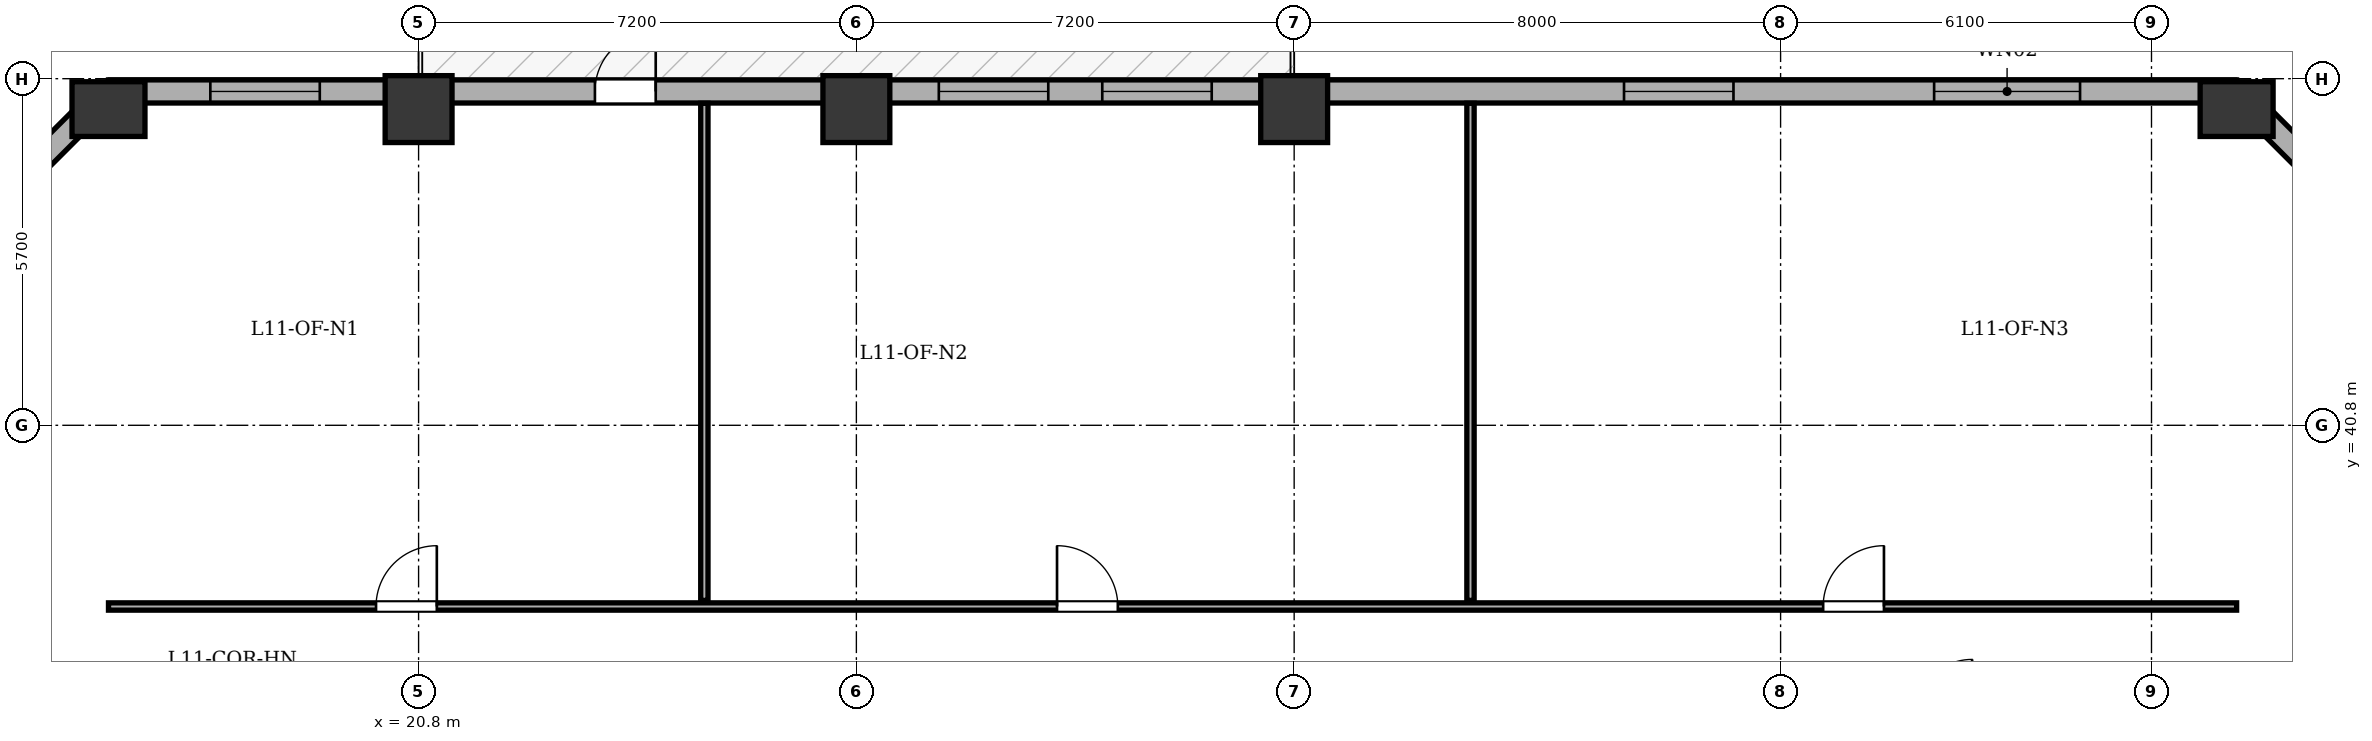
"""IFC4 building model, lengths in metres.
Left out: names, types, materials, properties, quantities, classifications, styles, units other than length and angle.
Written with IfcOpenShell. Run it as: python <this file> out.ifc"""

import sys

from ifc_helpers import new_model, si_unit, direction, frame, frame_2d, origin, origin_2d, place, context, subcontext, project, spatial, rectangle, extrude, element, fill, save


model = new_model("IFC4")
c1 = context("Model", 3, precision=1e-05, world=origin(), true_north=direction((0.0, 1.0)))
c2 = subcontext(c1, "Body", "Model", "MODEL_VIEW")
j1 = project(units=[si_unit("LENGTHUNIT", "METRE"), si_unit("PLANEANGLEUNIT", "RADIAN")], contexts=[c1])
p1 = place(None, origin())
s1 = spatial("IfcSite", under=j1, at=p1, CompositionType="ELEMENT")
p2 = place(p1, origin())
s2 = spatial("IfcBuilding", under=s1, at=p2, CompositionType="ELEMENT")
p3 = place(p2, frame((0.0, 0.0, 47.7)))
s3 = spatial("IfcBuildingStorey", under=s2, at=p3, CompositionType="ELEMENT", Elevation=47.7)
p4 = place(p3, frame((15.7, 46.0, 0.0), z_axis=(0.0, 0.0, 1.0), x_axis=(1.0, 0.0, 0.0)))
e1 = element("IfcColumn", 1, at=p4, inside=s3, PredefinedType="COLUMN", context=c2, shape_type="SweptSolid", body=[
    extrude(rectangle(XDim=0.9, YDim=1.2, at=origin_2d()), origin(), (0.0, 0.0, 1.0), 3.9),
])
for number, where, z_axis, x_axis in (
    (2, (20.8, 46.0, 0.0), (0.0, 0.0, 1.0), (1.0, 0.0, 0.0)),
    (3, (28.0, 46.0, 0.0), (0.0, 0.0, 1.0), (1.0, 0.0, 0.0)),
    (4, (35.2, 46.0, 0.0), (0.0, 0.0, 1.0), (1.0, 0.0, 0.0)),
):
    element("IfcColumn", number, at=place(p3, frame(where, z_axis=z_axis, x_axis=x_axis)), inside=s3, PredefinedType="COLUMN", context=c2, shape_type="SweptSolid", body=[
        extrude(rectangle(XDim=1.1, YDim=1.1, at=origin_2d()), origin(), (0.0, 0.0, 1.0), 3.9),
    ])
p5 = place(p3, frame((50.7, 46.0, 0.0), z_axis=(0.0, 0.0, 1.0), x_axis=(1.0, 0.0, 0.0)))
e5 = element("IfcColumn", 5, at=p5, inside=s3, PredefinedType="COLUMN", context=c2, shape_type="SweptSolid", body=[
    extrude(rectangle(XDim=0.9, YDim=1.2, at=origin_2d()), origin(), (0.0, 0.0, 1.0), 3.9),
])
p6 = place(p3, frame((10.91, 41.5, 0.0), z_axis=(0.0, 0.0, 1.0), x_axis=(0.707106781187, 0.707106781187, 0.0)))
e6 = element("IfcWall", 6, at=p6, inside=s3, PredefinedType="STANDARD", context=c2, shape_type="SweptSolid", body=[
    extrude(rectangle(XDim=6.774, YDim=0.38, at=frame_2d((3.387, 0.0))), origin(), (0.0, 0.0, 1.0), 3.135),
])
p7 = place(p6, frame((2.687, 0.0, 0.8)))
e7 = element("IfcOpeningElement", 7, at=p7, cuts=e6, PredefinedType="OPENING", context=c2, shape_type="SweptSolid", body=[
    extrude(rectangle(XDim=1.4, YDim=1.65, at=frame_2d((0.7, 0.825))), frame((0.0, 0.2, 0.0), z_axis=(0.0, -1.0, 0.0), x_axis=(1.0, 0.0, 0.0)), (0.0, 0.0, 1.0), 0.4),
])
p8 = place(p3, frame((15.7, 46.29, 0.0), z_axis=(0.0, 0.0, 1.0), x_axis=(1.0, 0.0, 0.0)))
e8 = element("IfcWall", 8, at=p8, inside=s3, PredefinedType="STANDARD", context=c2, shape_type="SweptSolid", body=[
    extrude(rectangle(XDim=35.0, YDim=0.38, at=frame_2d((17.5, 0.0))), origin(), (0.0, 0.0, 1.0), 3.135),
])
p9 = place(p8, frame((8.0, 0.0, 0.0)))
e9 = element("IfcOpeningElement", 9, at=p9, cuts=e8, PredefinedType="OPENING", context=c2, shape_type="SweptSolid", body=[
    extrude(rectangle(XDim=1.0, YDim=2.02, at=frame_2d((0.5, 1.01))), frame((0.0, 0.2, 0.0), z_axis=(0.0, -1.0, 0.0), x_axis=(1.0, 0.0, 0.0)), (0.0, 0.0, 1.0), 0.4),
])
p10 = place(p8, frame((1.675, 0.0, 0.8)))
e10 = element("IfcOpeningElement", 10, at=p10, cuts=e8, PredefinedType="OPENING", context=c2, shape_type="SweptSolid", body=[
    extrude(rectangle(XDim=1.8, YDim=1.9, at=frame_2d((0.9, 0.95))), frame((0.0, 0.2, 0.0), z_axis=(0.0, -1.0, 0.0), x_axis=(1.0, 0.0, 0.0)), (0.0, 0.0, 1.0), 0.4),
])
p11 = place(p8, frame((13.656, 0.0, 0.8)))
e11 = element("IfcOpeningElement", 11, at=p11, cuts=e8, PredefinedType="OPENING", context=c2, shape_type="SweptSolid", body=[
    extrude(rectangle(XDim=1.8, YDim=1.9, at=frame_2d((0.9, 0.95))), frame((0.0, 0.2, 0.0), z_axis=(0.0, -1.0, 0.0), x_axis=(1.0, 0.0, 0.0)), (0.0, 0.0, 1.0), 0.4),
])
p12 = place(p8, frame((16.344, 0.0, 0.8)))
e12 = element("IfcOpeningElement", 12, at=p12, cuts=e8, PredefinedType="OPENING", context=c2, shape_type="SweptSolid", body=[
    extrude(rectangle(XDim=1.8, YDim=1.9, at=frame_2d((0.9, 0.95))), frame((0.0, 0.2, 0.0), z_axis=(0.0, -1.0, 0.0), x_axis=(1.0, 0.0, 0.0)), (0.0, 0.0, 1.0), 0.4),
])
p13 = place(p8, frame((24.925, 0.0, 0.8)))
e13 = element("IfcOpeningElement", 13, at=p13, cuts=e8, PredefinedType="OPENING", context=c2, shape_type="SweptSolid", body=[
    extrude(rectangle(XDim=1.8, YDim=1.9, at=frame_2d((0.9, 0.95))), frame((0.0, 0.2, 0.0), z_axis=(0.0, -1.0, 0.0), x_axis=(1.0, 0.0, 0.0)), (0.0, 0.0, 1.0), 0.4),
])
p14 = place(p8, frame((30.025, 0.0, 0.8)))
e14 = element("IfcOpeningElement", 14, at=p14, cuts=e8, PredefinedType="OPENING", context=c2, shape_type="SweptSolid", body=[
    extrude(rectangle(XDim=2.4, YDim=1.9, at=frame_2d((1.2, 0.95))), frame((0.0, 0.2, 0.0), z_axis=(0.0, -1.0, 0.0), x_axis=(1.0, 0.0, 0.0)), (0.0, 0.0, 1.0), 0.4),
])
p15 = place(p3, frame((50.7, 46.29, 0.0), z_axis=(0.0, 0.0, 1.0), x_axis=(0.707106781187, -0.707106781187, 0.0)))
e15 = element("IfcWall", 15, at=p15, inside=s3, PredefinedType="STANDARD", context=c2, shape_type="SweptSolid", body=[
    extrude(rectangle(XDim=6.774, YDim=0.38, at=frame_2d((3.387, 0.0))), origin(), (0.0, 0.0, 1.0), 3.135),
])
p16 = place(p15, frame((2.687, 0.0, 0.8)))
e16 = element("IfcOpeningElement", 16, at=p16, cuts=e15, PredefinedType="OPENING", context=c2, shape_type="SweptSolid", body=[
    extrude(rectangle(XDim=1.4, YDim=1.65, at=frame_2d((0.7, 0.825))), frame((0.0, 0.2, 0.0), z_axis=(0.0, -1.0, 0.0), x_axis=(1.0, 0.0, 0.0)), (0.0, 0.0, 1.0), 0.4),
])
p17 = place(p3, frame((15.7, 37.82, 0.0), z_axis=(0.0, 0.0, 1.0), x_axis=(1.0, 0.0, 0.0)))
e17 = element("IfcWall", 17, at=p17, inside=s3, PredefinedType="PARTITIONING", context=c2, shape_type="SweptSolid", body=[
    extrude(rectangle(XDim=35.0, YDim=0.12, at=frame_2d((17.5, 0.0))), origin(), (0.0, 0.0, 1.0), 3.6),
])
p18 = place(p17, frame((4.4, 0.0, 0.0)))
e18 = element("IfcOpeningElement", 18, at=p18, cuts=e17, PredefinedType="OPENING", context=c2, shape_type="SweptSolid", body=[
    extrude(rectangle(XDim=1.0, YDim=2.1, at=frame_2d((0.5, 1.05))), frame((0.0, 0.07, 0.0), z_axis=(0.0, -1.0, 0.0), x_axis=(1.0, 0.0, 0.0)), (0.0, 0.0, 1.0), 0.14),
])
p19 = place(p17, frame((15.6, 0.0, 0.0)))
e19 = element("IfcOpeningElement", 19, at=p19, cuts=e17, PredefinedType="OPENING", context=c2, shape_type="SweptSolid", body=[
    extrude(rectangle(XDim=1.0, YDim=2.1, at=frame_2d((0.5, 1.05))), frame((0.0, 0.07, 0.0), z_axis=(0.0, -1.0, 0.0), x_axis=(1.0, 0.0, 0.0)), (0.0, 0.0, 1.0), 0.14),
])
p20 = place(p17, frame((28.2, 0.0, 0.0)))
e20 = element("IfcOpeningElement", 20, at=p20, cuts=e17, PredefinedType="OPENING", context=c2, shape_type="SweptSolid", body=[
    extrude(rectangle(XDim=1.0, YDim=2.1, at=frame_2d((0.5, 1.05))), frame((0.0, 0.07, 0.0), z_axis=(0.0, -1.0, 0.0), x_axis=(1.0, 0.0, 0.0)), (0.0, 0.0, 1.0), 0.14),
])
for number, where, z_axis, x_axis in (
    (21, (25.5, 37.92, 0.0), (0.0, 0.0, 1.0), (0.0, 1.0, 0.0)),
    (22, (38.1, 37.92, 0.0), (0.0, 0.0, 1.0), (0.0, 1.0, 0.0)),
):
    element("IfcWall", number, at=place(p3, frame(where, z_axis=z_axis, x_axis=x_axis)), inside=s3, PredefinedType="PARTITIONING", context=c2, shape_type="SweptSolid", body=[
        extrude(rectangle(XDim=8.175, YDim=0.12, at=frame_2d((4.087, 0.0))), origin(), (0.0, 0.0, 1.0), 3.6),
    ])
p21 = place(p9, origin())
e23 = element("IfcDoor", 23, at=p21, inside=s3, OperationType="SINGLE_SWING_RIGHT", PredefinedType="DOOR", context=c2, shape_type="SweptSolid", body=[
    extrude(rectangle(XDim=1.0, YDim=2.02, at=frame_2d((0.5, 1.01))), frame((0.0, 0.025, 0.0), z_axis=(0.0, -1.0, 0.0), x_axis=(1.0, 0.0, 0.0)), (0.0, 0.0, 1.0), 0.05),
])
fill(e9, e23)
p22 = place(p10, origin())
e24 = element("IfcWindow", 24, at=p22, inside=s3, PartitioningType="SINGLE_PANEL", PredefinedType="WINDOW", context=c2, shape_type="SweptSolid", body=[
    extrude(rectangle(XDim=1.8, YDim=1.9, at=frame_2d((0.9, 0.95))), frame((0.0, -0.01, 0.0), z_axis=(0.0, -1.0, 0.0), x_axis=(1.0, 0.0, 0.0)), (0.0, 0.0, 1.0), 0.06),
])
fill(e10, e24)
p23 = place(p11, origin())
e25 = element("IfcWindow", 25, at=p23, inside=s3, PartitioningType="SINGLE_PANEL", PredefinedType="WINDOW", context=c2, shape_type="SweptSolid", body=[
    extrude(rectangle(XDim=1.8, YDim=1.9, at=frame_2d((0.9, 0.95))), frame((0.0, -0.01, 0.0), z_axis=(0.0, -1.0, 0.0), x_axis=(1.0, 0.0, 0.0)), (0.0, 0.0, 1.0), 0.06),
])
fill(e11, e25)
p24 = place(p12, origin())
e26 = element("IfcWindow", 26, at=p24, inside=s3, PartitioningType="SINGLE_PANEL", PredefinedType="WINDOW", context=c2, shape_type="SweptSolid", body=[
    extrude(rectangle(XDim=1.8, YDim=1.9, at=frame_2d((0.9, 0.95))), frame((0.0, -0.01, 0.0), z_axis=(0.0, -1.0, 0.0), x_axis=(1.0, 0.0, 0.0)), (0.0, 0.0, 1.0), 0.06),
])
fill(e12, e26)
p25 = place(p13, origin())
e27 = element("IfcWindow", 27, at=p25, inside=s3, PartitioningType="SINGLE_PANEL", PredefinedType="WINDOW", context=c2, shape_type="SweptSolid", body=[
    extrude(rectangle(XDim=1.8, YDim=1.9, at=frame_2d((0.9, 0.95))), frame((0.0, -0.01, 0.0), z_axis=(0.0, -1.0, 0.0), x_axis=(1.0, 0.0, 0.0)), (0.0, 0.0, 1.0), 0.06),
])
fill(e13, e27)
p26 = place(p14, origin())
e28 = element("IfcWindow", 28, at=p26, inside=s3, PartitioningType="SINGLE_PANEL", PredefinedType="WINDOW", context=c2, shape_type="SweptSolid", body=[
    extrude(rectangle(XDim=2.4, YDim=1.9, at=frame_2d((1.2, 0.95))), frame((0.0, -0.01, 0.0), z_axis=(0.0, -1.0, 0.0), x_axis=(1.0, 0.0, 0.0)), (0.0, 0.0, 1.0), 0.06),
])
fill(e14, e28)
p27 = place(p18, origin())
e29 = element("IfcDoor", 29, at=p27, inside=s3, OperationType="SINGLE_SWING_RIGHT", PredefinedType="DOOR", context=c2, shape_type="SweptSolid", body=[
    extrude(rectangle(XDim=1.0, YDim=2.1, at=frame_2d((0.5, 1.05))), frame((0.0, 0.025, 0.0), z_axis=(0.0, -1.0, 0.0), x_axis=(1.0, 0.0, 0.0)), (0.0, 0.0, 1.0), 0.05),
])
fill(e18, e29)
p28 = place(p19, origin())
e30 = element("IfcDoor", 30, at=p28, inside=s3, OperationType="SINGLE_SWING_LEFT", PredefinedType="DOOR", context=c2, shape_type="SweptSolid", body=[
    extrude(rectangle(XDim=1.0, YDim=2.1, at=frame_2d((0.5, 1.05))), frame((0.0, 0.025, 0.0), z_axis=(0.0, -1.0, 0.0), x_axis=(1.0, 0.0, 0.0)), (0.0, 0.0, 1.0), 0.05),
])
fill(e19, e30)
p29 = place(p20, origin())
e31 = element("IfcDoor", 31, at=p29, inside=s3, OperationType="SINGLE_SWING_RIGHT", PredefinedType="DOOR", context=c2, shape_type="SweptSolid", body=[
    extrude(rectangle(XDim=1.0, YDim=2.1, at=frame_2d((0.5, 1.05))), frame((0.0, 0.025, 0.0), z_axis=(0.0, -1.0, 0.0), x_axis=(1.0, 0.0, 0.0)), (0.0, 0.0, 1.0), 0.05),
])
fill(e20, e31)
save(model, sys.argv[1])
